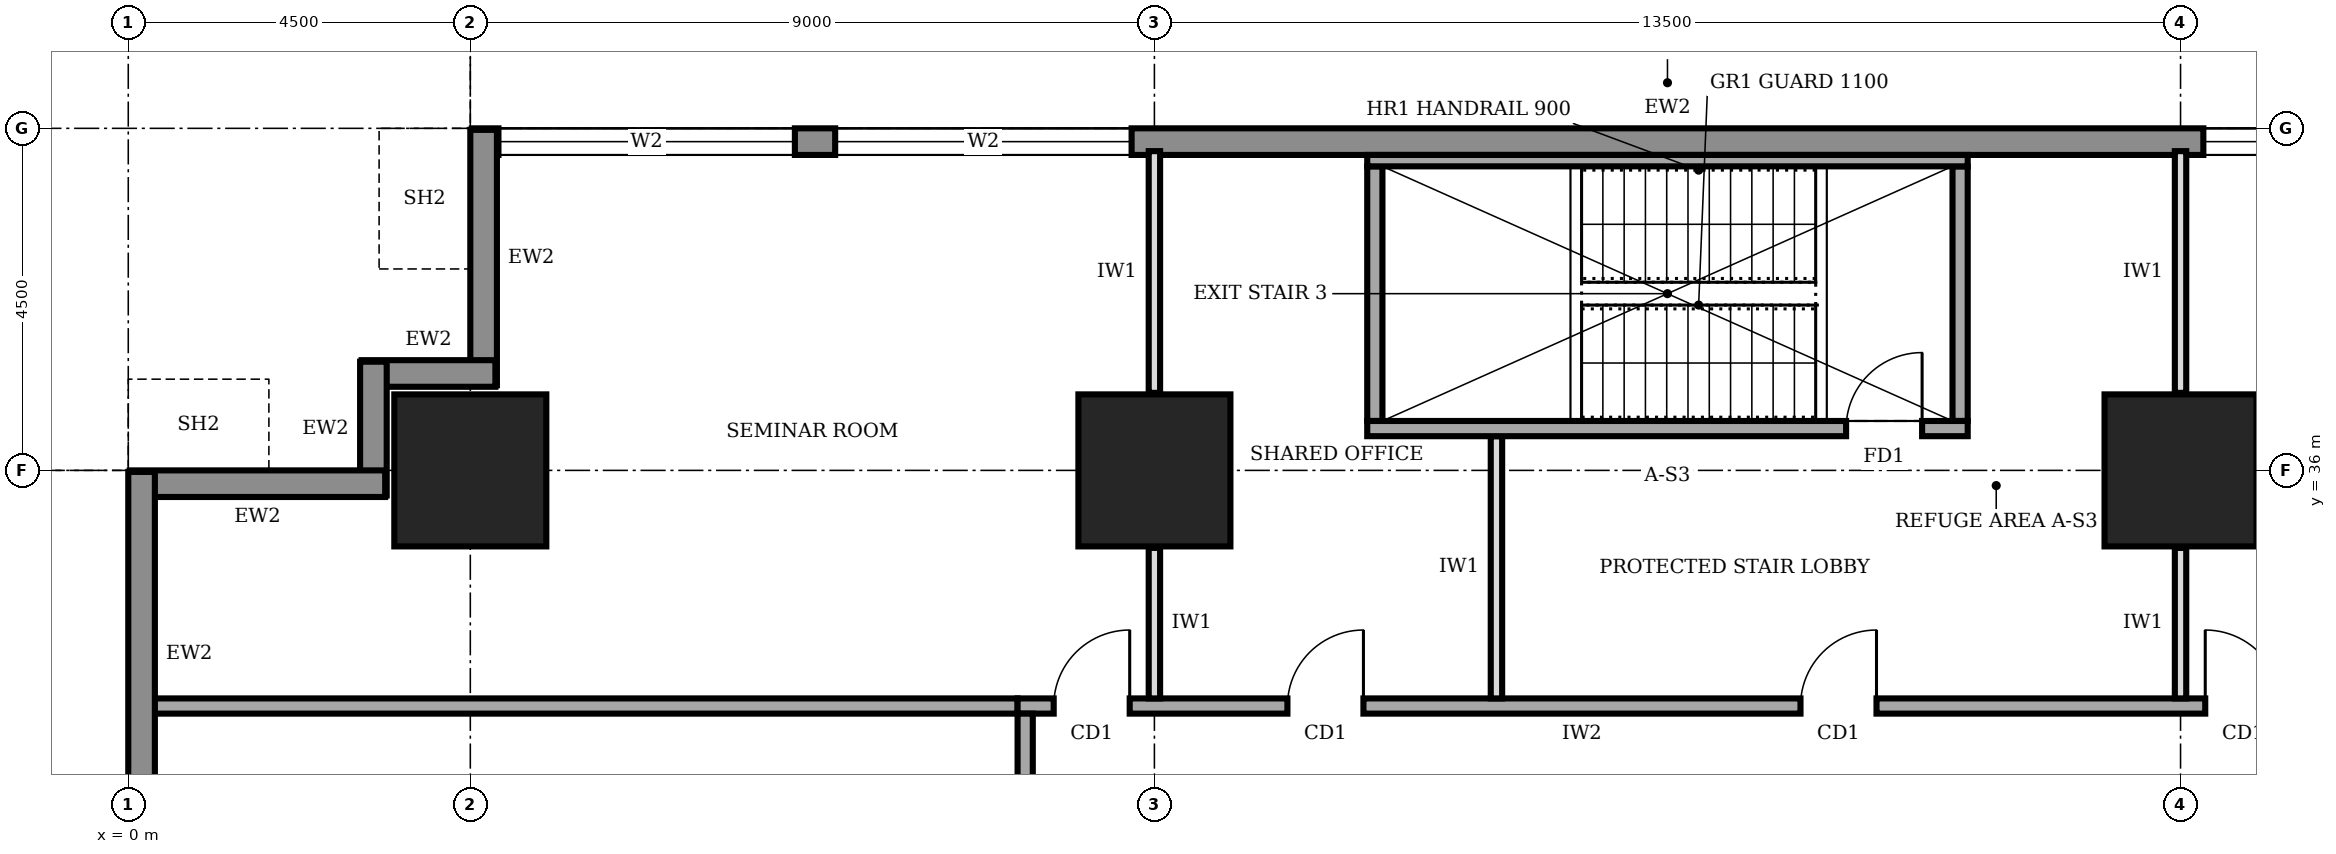
"""IFC4 building model, lengths in metres.
Left out: names, types, materials, properties, quantities, classifications, styles, units other than length and angle.
Written with IfcOpenShell. Run it as: python <this file> out.ifc"""

import sys

from ifc_helpers import new_model, si_unit, direction, frame, frame_2d, origin, origin_2d, place, context, subcontext, project, spatial, rectangle, extrude, element, fill, save


model = new_model("IFC4")
c1 = context("Model", 3, precision=1e-05, world=origin(), true_north=direction((0.0, 1.0)))
c2 = subcontext(c1, "Body", "Model", "MODEL_VIEW")
j1 = project(units=[si_unit("LENGTHUNIT", "METRE"), si_unit("PLANEANGLEUNIT", "RADIAN")], contexts=[c1])
p1 = place(None, origin())
s1 = spatial("IfcSite", under=j1, at=p1, CompositionType="ELEMENT")
p2 = place(p1, origin())
s2 = spatial("IfcBuilding", under=s1, at=p2, CompositionType="ELEMENT")
p3 = place(p2, frame((0.0, 0.0, 53.0)))
s3 = spatial("IfcBuildingStorey", under=s2, at=p3, CompositionType="ELEMENT", Elevation=53.0)
for number, where, z_axis, x_axis in (
    (1, (4.5, 36.0, 0.0), (0.0, 0.0, 1.0), (1.0, 0.0, 0.0)),
    (2, (13.5, 36.0, 0.0), (0.0, 0.0, 1.0), (1.0, 0.0, 0.0)),
    (3, (27.0, 36.0, 0.0), (0.0, 0.0, 1.0), (1.0, 0.0, 0.0)),
):
    element("IfcColumn", number, at=place(p3, frame(where, z_axis=z_axis, x_axis=x_axis)), inside=s3, PredefinedType="COLUMN", context=c2, shape_type="SweptSolid", body=[
        extrude(rectangle(XDim=2.0, YDim=2.0, at=origin_2d()), origin(), (0.0, 0.0, 1.0), 4.0),
    ])
p4 = place(p3, frame((35.98, 40.325, 0.0), z_axis=(0.0, 0.0, 1.0), x_axis=(-1.0, 0.0, 0.0)))
e4 = element("IfcWall", 4, at=p4, inside=s3, PredefinedType="STANDARD", context=c2, shape_type="SweptSolid", body=[
    extrude(rectangle(XDim=31.46, YDim=0.35, at=frame_2d((15.73, 0.0))), origin(), (0.0, 0.0, 1.0), 3.75),
])
p5 = place(p4, frame((27.21, 0.0, 0.6)))
e5 = element("IfcOpeningElement", 5, at=p5, cuts=e4, PredefinedType="OPENING", context=c2, shape_type="SweptSolid", body=[
    extrude(rectangle(XDim=3.9, YDim=2.6, at=frame_2d((1.95, 1.3))), frame((0.0, 0.185, 0.0), z_axis=(0.0, -1.0, 0.0), x_axis=(1.0, 0.0, 0.0)), (0.0, 0.0, 1.0), 0.37),
])
p6 = place(p4, frame((22.78, 0.0, 0.6)))
e6 = element("IfcOpeningElement", 6, at=p6, cuts=e4, PredefinedType="OPENING", context=c2, shape_type="SweptSolid", body=[
    extrude(rectangle(XDim=3.9, YDim=2.6, at=frame_2d((1.95, 1.3))), frame((0.0, 0.185, 0.0), z_axis=(0.0, -1.0, 0.0), x_axis=(1.0, 0.0, 0.0)), (0.0, 0.0, 1.0), 0.37),
])
p7 = place(p4, frame((4.78, 0.0, 0.6)))
e7 = element("IfcOpeningElement", 7, at=p7, cuts=e4, PredefinedType="OPENING", context=c2, shape_type="SweptSolid", body=[
    extrude(rectangle(XDim=3.9, YDim=2.6, at=frame_2d((1.95, 1.3))), frame((0.0, 0.185, 0.0), z_axis=(0.0, -1.0, 0.0), x_axis=(1.0, 0.0, 0.0)), (0.0, 0.0, 1.0), 0.37),
])
p8 = place(p3, frame((4.675, 40.48, 0.0), z_axis=(0.0, 0.0, 1.0), x_axis=(0.0, -1.0, 0.0)))
e8 = element("IfcWall", 8, at=p8, inside=s3, PredefinedType="STANDARD", context=c2, shape_type="SweptSolid", body=[
    extrude(rectangle(XDim=3.36, YDim=0.35, at=frame_2d((1.68, 0.0))), origin(), (0.0, 0.0, 1.0), 2.85),
])
for number, where, z_axis, x_axis in (
    (9, (4.83, 37.275, 0.0), (0.0, 0.0, 1.0), (-1.0, 0.0, 0.0)),
    (10, (3.225, 37.43, 0.0), (0.0, 0.0, 1.0), (0.0, -1.0, 0.0)),
):
    element("IfcWall", number, at=place(p3, frame(where, z_axis=z_axis, x_axis=x_axis)), inside=s3, PredefinedType="STANDARD", context=c2, shape_type="SweptSolid", body=[
        extrude(rectangle(XDim=1.76, YDim=0.35, at=frame_2d((0.88, 0.0))), origin(), (0.0, 0.0, 1.0), 3.75),
    ])
p9 = place(p3, frame((3.38, 35.825, 0.0), z_axis=(0.0, 0.0, 1.0), x_axis=(-1.0, 0.0, 0.0)))
e11 = element("IfcWall", 11, at=p9, inside=s3, PredefinedType="STANDARD", context=c2, shape_type="SweptSolid", body=[
    extrude(rectangle(XDim=3.36, YDim=0.35, at=frame_2d((1.68, 0.0))), origin(), (0.0, 0.0, 1.0), 2.85),
])
p10 = place(p3, frame((0.175, 35.98, 0.0), z_axis=(0.0, 0.0, 1.0), x_axis=(0.0, -1.0, 0.0)))
e12 = element("IfcWall", 12, at=p10, inside=s3, PredefinedType="STANDARD", context=c2, shape_type="SweptSolid", body=[
    extrude(rectangle(XDim=31.46, YDim=0.35, at=frame_2d((15.73, 0.0))), origin(), (0.0, 0.0, 1.0), 3.75),
])
p11 = place(p10, frame((27.21, 0.0, 0.6)))
e13 = element("IfcOpeningElement", 13, at=p11, cuts=e12, PredefinedType="OPENING", context=c2, shape_type="SweptSolid", body=[
    extrude(rectangle(XDim=3.9, YDim=2.6, at=frame_2d((1.95, 1.3))), frame((0.0, 0.185, 0.0), z_axis=(0.0, -1.0, 0.0), x_axis=(1.0, 0.0, 0.0)), (0.0, 0.0, 1.0), 0.37),
])
p12 = place(p10, frame((22.78, 0.0, 0.6)))
e14 = element("IfcOpeningElement", 14, at=p12, cuts=e12, PredefinedType="OPENING", context=c2, shape_type="SweptSolid", body=[
    extrude(rectangle(XDim=3.9, YDim=2.6, at=frame_2d((1.95, 1.3))), frame((0.0, 0.185, 0.0), z_axis=(0.0, -1.0, 0.0), x_axis=(1.0, 0.0, 0.0)), (0.0, 0.0, 1.0), 0.37),
])
p13 = place(p10, frame((18.28, 0.0, 0.6)))
e15 = element("IfcOpeningElement", 15, at=p13, cuts=e12, PredefinedType="OPENING", context=c2, shape_type="SweptSolid", body=[
    extrude(rectangle(XDim=3.9, YDim=2.6, at=frame_2d((1.95, 1.3))), frame((0.0, 0.185, 0.0), z_axis=(0.0, -1.0, 0.0), x_axis=(1.0, 0.0, 0.0)), (0.0, 0.0, 1.0), 0.37),
])
p14 = place(p10, frame((13.78, 0.0, 0.6)))
e16 = element("IfcOpeningElement", 16, at=p14, cuts=e12, PredefinedType="OPENING", context=c2, shape_type="SweptSolid", body=[
    extrude(rectangle(XDim=3.9, YDim=2.6, at=frame_2d((1.95, 1.3))), frame((0.0, 0.185, 0.0), z_axis=(0.0, -1.0, 0.0), x_axis=(1.0, 0.0, 0.0)), (0.0, 0.0, 1.0), 0.37),
])
p15 = place(p10, frame((9.28, 0.0, 0.6)))
e17 = element("IfcOpeningElement", 17, at=p15, cuts=e12, PredefinedType="OPENING", context=c2, shape_type="SweptSolid", body=[
    extrude(rectangle(XDim=3.9, YDim=2.6, at=frame_2d((1.95, 1.3))), frame((0.0, 0.185, 0.0), z_axis=(0.0, -1.0, 0.0), x_axis=(1.0, 0.0, 0.0)), (0.0, 0.0, 1.0), 0.37),
])
p16 = place(p10, frame((4.78, 0.0, 0.6)))
e18 = element("IfcOpeningElement", 18, at=p16, cuts=e12, PredefinedType="OPENING", context=c2, shape_type="SweptSolid", body=[
    extrude(rectangle(XDim=3.9, YDim=2.6, at=frame_2d((1.95, 1.3))), frame((0.0, 0.185, 0.0), z_axis=(0.0, -1.0, 0.0), x_axis=(1.0, 0.0, 0.0)), (0.0, 0.0, 1.0), 0.37),
])
p17 = place(p3, frame((28.6, 32.9, 0.0), z_axis=(0.0, 0.0, 1.0), x_axis=(-1.0, 0.0, 0.0)))
e19 = element("IfcWall", 19, at=p17, inside=s3, PredefinedType="SOLIDWALL", context=c2, shape_type="SweptSolid", body=[
    extrude(rectangle(XDim=16.9, YDim=0.2, at=frame_2d((8.45, 0.0))), origin(), (0.0, 0.0, 1.0), 3.75),
])
p18 = place(p17, frame((15.425, 0.0, 0.0)))
e20 = element("IfcOpeningElement", 20, at=p18, cuts=e19, PredefinedType="OPENING", context=c2, shape_type="SweptSolid", body=[
    extrude(rectangle(XDim=1.0, YDim=2.1, at=frame_2d((0.5, 1.05))), frame((0.0, 0.11, 0.0), z_axis=(0.0, -1.0, 0.0), x_axis=(1.0, 0.0, 0.0)), (0.0, 0.0, 1.0), 0.22),
])
p19 = place(p17, frame((12.35, 0.0, 0.0)))
e21 = element("IfcOpeningElement", 21, at=p19, cuts=e19, PredefinedType="OPENING", context=c2, shape_type="SweptSolid", body=[
    extrude(rectangle(XDim=1.0, YDim=2.1, at=frame_2d((0.5, 1.05))), frame((0.0, 0.11, 0.0), z_axis=(0.0, -1.0, 0.0), x_axis=(1.0, 0.0, 0.0)), (0.0, 0.0, 1.0), 0.22),
])
p20 = place(p17, frame((5.6, 0.0, 0.0)))
e22 = element("IfcOpeningElement", 22, at=p20, cuts=e19, PredefinedType="OPENING", context=c2, shape_type="SweptSolid", body=[
    extrude(rectangle(XDim=1.0, YDim=2.1, at=frame_2d((0.5, 1.05))), frame((0.0, 0.11, 0.0), z_axis=(0.0, -1.0, 0.0), x_axis=(1.0, 0.0, 0.0)), (0.0, 0.0, 1.0), 0.22),
])
p21 = place(p17, frame((0.275, 0.0, 0.0)))
e23 = element("IfcOpeningElement", 23, at=p21, cuts=e19, PredefinedType="OPENING", context=c2, shape_type="SweptSolid", body=[
    extrude(rectangle(XDim=1.0, YDim=2.1, at=frame_2d((0.5, 1.05))), frame((0.0, 0.11, 0.0), z_axis=(0.0, -1.0, 0.0), x_axis=(1.0, 0.0, 0.0)), (0.0, 0.0, 1.0), 0.22),
])
p22 = place(p3, frame((11.8, 32.8, 0.0), z_axis=(0.0, 0.0, 1.0), x_axis=(0.0, -1.0, 0.0)))
e24 = element("IfcWall", 24, at=p22, inside=s3, PredefinedType="SOLIDWALL", context=c2, shape_type="SweptSolid", body=[
    extrude(rectangle(XDim=23.8, YDim=0.2, at=frame_2d((11.9, 0.0))), origin(), (0.0, 0.0, 1.0), 3.75),
])
p23 = place(p22, frame((21.05, 0.0, 0.0)))
e25 = element("IfcOpeningElement", 25, at=p23, cuts=e24, PredefinedType="OPENING", context=c2, shape_type="SweptSolid", body=[
    extrude(rectangle(XDim=1.0, YDim=2.1, at=frame_2d((0.5, 1.05))), frame((0.0, 0.11, 0.0), z_axis=(0.0, -1.0, 0.0), x_axis=(1.0, 0.0, 0.0)), (0.0, 0.0, 1.0), 0.22),
])
p24 = place(p22, frame((17.15, 0.0, 0.0)))
e26 = element("IfcOpeningElement", 26, at=p24, cuts=e24, PredefinedType="OPENING", context=c2, shape_type="SweptSolid", body=[
    extrude(rectangle(XDim=0.9, YDim=2.1, at=frame_2d((0.45, 1.05))), frame((0.0, 0.11, 0.0), z_axis=(0.0, -1.0, 0.0), x_axis=(1.0, 0.0, 0.0)), (0.0, 0.0, 1.0), 0.22),
])
p25 = place(p22, frame((12.35, 0.0, 0.0)))
e27 = element("IfcOpeningElement", 27, at=p25, cuts=e24, PredefinedType="OPENING", context=c2, shape_type="SweptSolid", body=[
    extrude(rectangle(XDim=0.9, YDim=2.1, at=frame_2d((0.45, 1.05))), frame((0.0, 0.11, 0.0), z_axis=(0.0, -1.0, 0.0), x_axis=(1.0, 0.0, 0.0)), (0.0, 0.0, 1.0), 0.22),
])
p26 = place(p22, frame((9.3, 0.0, 0.0)))
e28 = element("IfcOpeningElement", 28, at=p26, cuts=e24, PredefinedType="OPENING", context=c2, shape_type="SweptSolid", body=[
    extrude(rectangle(XDim=0.9, YDim=2.1, at=frame_2d((0.45, 1.05))), frame((0.0, 0.11, 0.0), z_axis=(0.0, -1.0, 0.0), x_axis=(1.0, 0.0, 0.0)), (0.0, 0.0, 1.0), 0.22),
])
p27 = place(p22, frame((6.3, 0.0, 0.0)))
e29 = element("IfcOpeningElement", 29, at=p27, cuts=e24, PredefinedType="OPENING", context=c2, shape_type="SweptSolid", body=[
    extrude(rectangle(XDim=1.0, YDim=2.1, at=frame_2d((0.5, 1.05))), frame((0.0, 0.11, 0.0), z_axis=(0.0, -1.0, 0.0), x_axis=(1.0, 0.0, 0.0)), (0.0, 0.0, 1.0), 0.22),
])
p28 = place(p22, frame((14.4, 0.0, 0.0)))
e30 = element("IfcOpeningElement", 30, at=p28, cuts=e24, PredefinedType="OPENING", context=c2, shape_type="SweptSolid", body=[
    extrude(rectangle(XDim=1.0, YDim=2.1, at=frame_2d((0.5, 1.05))), frame((0.0, 0.11, 0.0), z_axis=(0.0, -1.0, 0.0), x_axis=(1.0, 0.0, 0.0)), (0.0, 0.0, 1.0), 0.22),
])
p29 = place(p22, frame((2.3, 0.0, 0.0)))
e31 = element("IfcOpeningElement", 31, at=p29, cuts=e24, PredefinedType="OPENING", context=c2, shape_type="SweptSolid", body=[
    extrude(rectangle(XDim=1.0, YDim=2.1, at=frame_2d((0.5, 1.05))), frame((0.0, 0.11, 0.0), z_axis=(0.0, -1.0, 0.0), x_axis=(1.0, 0.0, 0.0)), (0.0, 0.0, 1.0), 0.22),
])
p30 = place(p3, frame((0.3, 32.9, 0.0), z_axis=(0.0, 0.0, 1.0), x_axis=(1.0, 0.0, 0.0)))
e32 = element("IfcWall", 32, at=p30, inside=s3, PredefinedType="SOLIDWALL", context=c2, shape_type="SweptSolid", body=[
    extrude(rectangle(XDim=11.4, YDim=0.2, at=frame_2d((5.7, 0.0))), origin(), (0.0, 0.0, 1.0), 3.75),
])
p31 = place(p3, frame((13.5, 33.0, 0.0), z_axis=(0.0, 0.0, 1.0), x_axis=(0.0, 1.0, 0.0)))
e33 = element("IfcWall", 33, at=p31, inside=s3, PredefinedType="PARTITIONING", context=c2, shape_type="SweptSolid", body=[
    extrude(rectangle(XDim=1.98, YDim=0.15, at=frame_2d((0.99, 0.0))), origin(), (0.0, 0.0, 1.0), 2.85),
])
p32 = place(p3, frame((13.5, 37.02, 0.0), z_axis=(0.0, 0.0, 1.0), x_axis=(0.0, 1.0, 0.0)))
e34 = element("IfcWall", 34, at=p32, inside=s3, PredefinedType="PARTITIONING", context=c2, shape_type="SweptSolid", body=[
    extrude(rectangle(XDim=3.18, YDim=0.15, at=frame_2d((1.59, 0.0))), origin(), (0.0, 0.0, 1.0), 2.85),
])
p33 = place(p3, frame((18.0, 33.0, 0.0), z_axis=(0.0, 0.0, 1.0), x_axis=(0.0, 1.0, 0.0)))
e35 = element("IfcWall", 35, at=p33, inside=s3, PredefinedType="PARTITIONING", context=c2, shape_type="SweptSolid", body=[
    extrude(rectangle(XDim=3.45, YDim=0.15, at=frame_2d((1.725, 0.0))), origin(), (0.0, 0.0, 1.0), 3.75),
])
p34 = place(p3, frame((27.0, 33.0, 0.0), z_axis=(0.0, 0.0, 1.0), x_axis=(0.0, 1.0, 0.0)))
e36 = element("IfcWall", 36, at=p34, inside=s3, PredefinedType="PARTITIONING", context=c2, shape_type="SweptSolid", body=[
    extrude(rectangle(XDim=1.98, YDim=0.15, at=frame_2d((0.99, 0.0))), origin(), (0.0, 0.0, 1.0), 2.85),
])
p35 = place(p3, frame((27.0, 37.02, 0.0), z_axis=(0.0, 0.0, 1.0), x_axis=(0.0, 1.0, 0.0)))
e37 = element("IfcWall", 37, at=p35, inside=s3, PredefinedType="PARTITIONING", context=c2, shape_type="SweptSolid", body=[
    extrude(rectangle(XDim=3.18, YDim=0.15, at=frame_2d((1.59, 0.0))), origin(), (0.0, 0.0, 1.0), 2.85),
])
p36 = place(p3, frame((16.3, 36.55, 0.0), z_axis=(0.0, 0.0, 1.0), x_axis=(1.0, 0.0, 0.0)))
e38 = element("IfcWall", 38, at=p36, inside=s3, PredefinedType="SOLIDWALL", context=c2, shape_type="SweptSolid", body=[
    extrude(rectangle(XDim=7.9, YDim=0.2, at=frame_2d((3.95, 0.0))), origin(), (0.0, 0.0, 1.0), 3.75),
])
p37 = place(p36, frame((6.3, 0.0, 0.0)))
e39 = element("IfcOpeningElement", 39, at=p37, cuts=e38, PredefinedType="OPENING", context=c2, shape_type="SweptSolid", body=[
    extrude(rectangle(XDim=1.0, YDim=2.1, at=frame_2d((0.5, 1.05))), frame((0.0, 0.11, 0.0), z_axis=(0.0, -1.0, 0.0), x_axis=(1.0, 0.0, 0.0)), (0.0, 0.0, 1.0), 0.22),
])
p38 = place(p3, frame((16.3, 40.075, 0.0), z_axis=(0.0, 0.0, 1.0), x_axis=(1.0, 0.0, 0.0)))
e40 = element("IfcWall", 40, at=p38, inside=s3, PredefinedType="SOLIDWALL", context=c2, shape_type="SweptSolid", body=[
    extrude(rectangle(XDim=7.9, YDim=0.15, at=frame_2d((3.95, 0.0))), origin(), (0.0, 0.0, 1.0), 3.75),
])
for number, where, z_axis, x_axis in (
    (41, (16.4, 36.65, 0.0), (0.0, 0.0, 1.0), (0.0, 1.0, 0.0)),
    (42, (24.1, 36.65, 0.0), (0.0, 0.0, 1.0), (0.0, 1.0, 0.0)),
):
    element("IfcWall", number, at=place(p3, frame(where, z_axis=z_axis, x_axis=x_axis)), inside=s3, PredefinedType="SOLIDWALL", context=c2, shape_type="SweptSolid", body=[
        extrude(rectangle(XDim=3.35, YDim=0.2, at=frame_2d((1.675, 0.0))), origin(), (0.0, 0.0, 1.0), 3.75),
    ])
p39 = place(p5, origin())
e43 = element("IfcWindow", 43, at=p39, inside=s3, PartitioningType="SINGLE_PANEL", PredefinedType="WINDOW", context=c2, shape_type="SweptSolid", body=[
    extrude(rectangle(XDim=3.9, YDim=2.6, at=frame_2d((1.95, 1.3))), frame((0.0, 0.03, 0.0), z_axis=(0.0, -1.0, 0.0), x_axis=(1.0, 0.0, 0.0)), (0.0, 0.0, 1.0), 0.06),
])
fill(e5, e43)
p40 = place(p6, origin())
e44 = element("IfcWindow", 44, at=p40, inside=s3, PartitioningType="SINGLE_PANEL", PredefinedType="WINDOW", context=c2, shape_type="SweptSolid", body=[
    extrude(rectangle(XDim=3.9, YDim=2.6, at=frame_2d((1.95, 1.3))), frame((0.0, 0.03, 0.0), z_axis=(0.0, -1.0, 0.0), x_axis=(1.0, 0.0, 0.0)), (0.0, 0.0, 1.0), 0.06),
])
fill(e6, e44)
p41 = place(p7, origin())
e45 = element("IfcWindow", 45, at=p41, inside=s3, PartitioningType="SINGLE_PANEL", PredefinedType="WINDOW", context=c2, shape_type="SweptSolid", body=[
    extrude(rectangle(XDim=3.9, YDim=2.6, at=frame_2d((1.95, 1.3))), frame((0.0, 0.03, 0.0), z_axis=(0.0, -1.0, 0.0), x_axis=(1.0, 0.0, 0.0)), (0.0, 0.0, 1.0), 0.06),
])
fill(e7, e45)
p42 = place(p18, frame((1.0, 0.0, 0.0), z_axis=(0.0, 0.0, 1.0), x_axis=(-1.0, 0.0, 0.0)))
e46 = element("IfcDoor", 46, at=p42, inside=s3, OperationType="SINGLE_SWING_RIGHT", PredefinedType="DOOR", context=c2, shape_type="SweptSolid", body=[
    extrude(rectangle(XDim=1.0, YDim=2.1, at=frame_2d((0.5, 1.05))), frame((0.0, 0.025, 0.0), z_axis=(0.0, -1.0, 0.0), x_axis=(1.0, 0.0, 0.0)), (0.0, 0.0, 1.0), 0.05),
])
fill(e20, e46)
p43 = place(p19, frame((1.0, 0.0, 0.0), z_axis=(0.0, 0.0, 1.0), x_axis=(-1.0, 0.0, 0.0)))
e47 = element("IfcDoor", 47, at=p43, inside=s3, OperationType="SINGLE_SWING_RIGHT", PredefinedType="DOOR", context=c2, shape_type="SweptSolid", body=[
    extrude(rectangle(XDim=1.0, YDim=2.1, at=frame_2d((0.5, 1.05))), frame((0.0, 0.025, 0.0), z_axis=(0.0, -1.0, 0.0), x_axis=(1.0, 0.0, 0.0)), (0.0, 0.0, 1.0), 0.05),
])
fill(e21, e47)
p44 = place(p20, frame((1.0, 0.0, 0.0), z_axis=(0.0, 0.0, 1.0), x_axis=(-1.0, 0.0, 0.0)))
e48 = element("IfcDoor", 48, at=p44, inside=s3, OperationType="SINGLE_SWING_RIGHT", PredefinedType="DOOR", context=c2, shape_type="SweptSolid", body=[
    extrude(rectangle(XDim=1.0, YDim=2.1, at=frame_2d((0.5, 1.05))), frame((0.0, 0.025, 0.0), z_axis=(0.0, -1.0, 0.0), x_axis=(1.0, 0.0, 0.0)), (0.0, 0.0, 1.0), 0.05),
])
fill(e22, e48)
p45 = place(p21, frame((1.0, 0.0, 0.0), z_axis=(0.0, 0.0, 1.0), x_axis=(-1.0, 0.0, 0.0)))
e49 = element("IfcDoor", 49, at=p45, inside=s3, OperationType="SINGLE_SWING_LEFT", PredefinedType="DOOR", context=c2, shape_type="SweptSolid", body=[
    extrude(rectangle(XDim=1.0, YDim=2.1, at=frame_2d((0.5, 1.05))), frame((0.0, 0.025, 0.0), z_axis=(0.0, -1.0, 0.0), x_axis=(1.0, 0.0, 0.0)), (0.0, 0.0, 1.0), 0.05),
])
fill(e23, e49)
p46 = place(p37, origin())
e50 = element("IfcDoor", 50, at=p46, inside=s3, OperationType="SINGLE_SWING_RIGHT", PredefinedType="DOOR", context=c2, shape_type="SweptSolid", body=[
    extrude(rectangle(XDim=1.0, YDim=2.1, at=frame_2d((0.5, 1.05))), frame((0.0, 0.025, 0.0), z_axis=(0.0, -1.0, 0.0), x_axis=(1.0, 0.0, 0.0)), (0.0, 0.0, 1.0), 0.05),
])
fill(e39, e50)
save(model, sys.argv[1])
